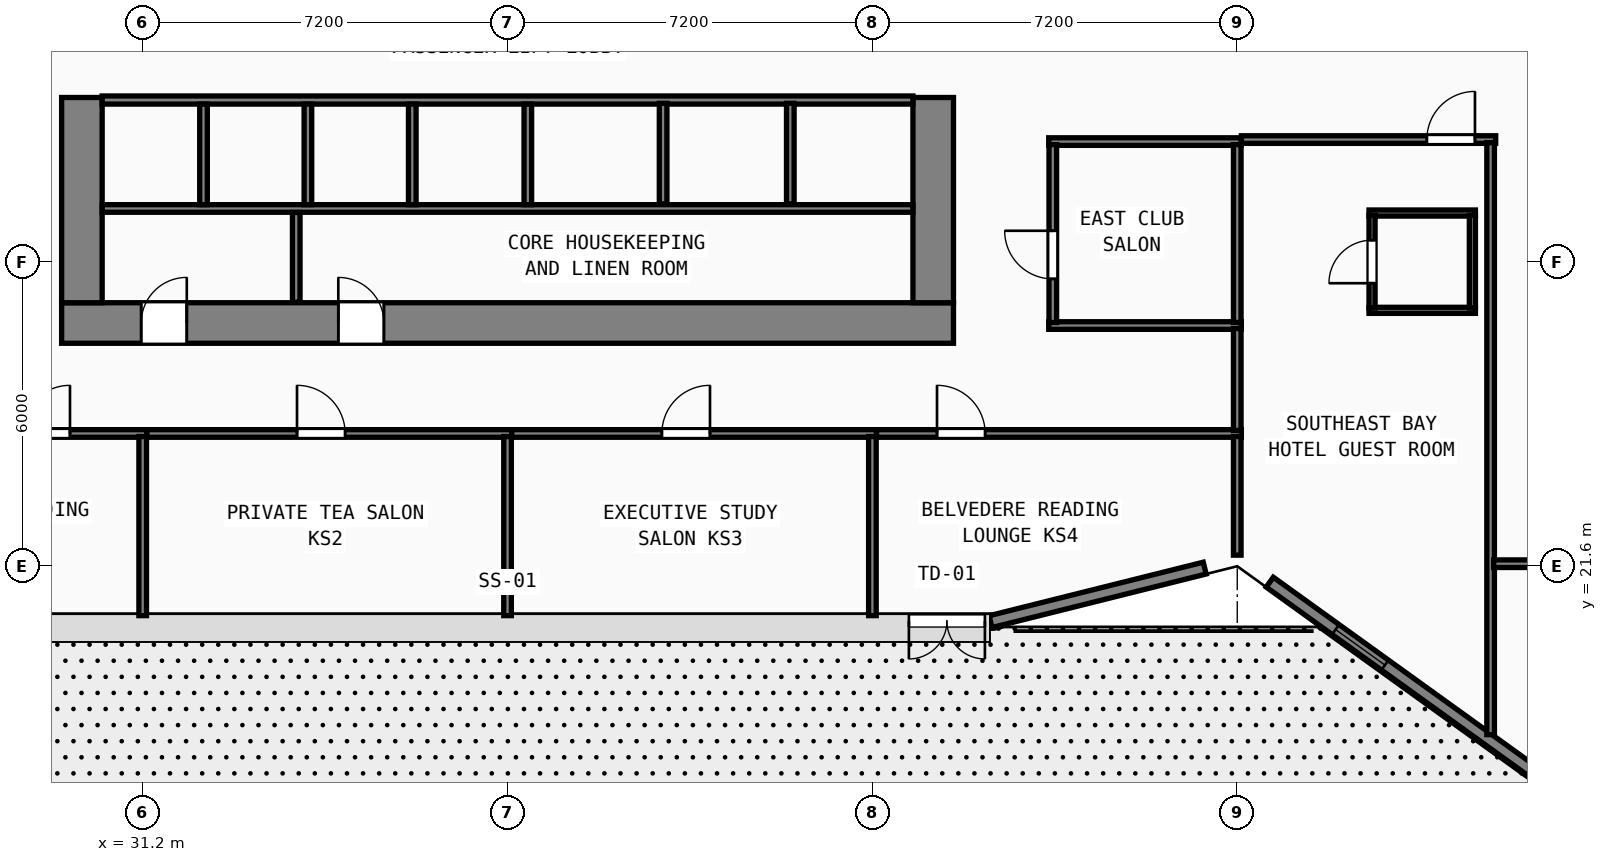
"""IFC4 building model, lengths in metres.
Left out: names, types, materials, properties, quantities, classifications, styles, units other than length and angle.
Written with IfcOpenShell. Run it as: python <this file> out.ifc"""

import sys

from ifc_helpers import new_model, si_unit, direction, frame, frame_2d, origin, origin_2d, place, context, subcontext, project, spatial, rectangle, hollow_rectangle, extrude, element, fill, save


model = new_model("IFC4")
c1 = context("Model", 3, precision=1e-05, world=origin(), true_north=direction((0.0, 1.0)))
c2 = subcontext(c1, "Body", "Model", "MODEL_VIEW")
j1 = project(units=[si_unit("LENGTHUNIT", "METRE"), si_unit("PLANEANGLEUNIT", "RADIAN")], contexts=[c1])
p1 = place(None, origin())
s1 = spatial("IfcSite", under=j1, at=p1, CompositionType="ELEMENT")
p2 = place(p1, origin())
s2 = spatial("IfcBuilding", under=s1, at=p2, CompositionType="ELEMENT")
p3 = place(p2, frame((0.0, 0.0, 24.0)))
s3 = spatial("IfcBuildingStorey", under=s2, at=p3, CompositionType="ELEMENT", Elevation=24.0)
p4 = place(p3, frame((29.6, 26.4, 0.0), z_axis=(0.0, 0.0, 1.0), x_axis=(1.0, 0.0, 0.0)))
e1 = element("IfcWall", 1, at=p4, inside=s3, PredefinedType="SHEAR", context=c2, shape_type="SweptSolid", body=[
    extrude(rectangle(XDim=17.6, YDim=0.8, at=frame_2d((8.8, 0.0))), origin(), (0.0, 0.0, 1.0), 3.6),
])
p5 = place(p4, frame((2.47, 0.0, 0.0), z_axis=(0.0, 0.0, 1.0), x_axis=(-1.0, 0.0, 0.0)))
e2 = element("IfcOpeningElement", 2, at=p5, cuts=e1, PredefinedType="OPENING", context=c2, shape_type="SweptSolid", body=[
    extrude(rectangle(XDim=0.9, YDim=2.1, at=frame_2d((0.45, 1.05))), frame((0.0, 0.41, 0.0), z_axis=(0.0, -1.0, 0.0), x_axis=(1.0, 0.0, 0.0)), (0.0, 0.0, 1.0), 0.82),
])
p6 = place(p4, frame((6.36, 0.0, 0.0), z_axis=(0.0, 0.0, 1.0), x_axis=(-1.0, 0.0, 0.0)))
e3 = element("IfcOpeningElement", 3, at=p6, cuts=e1, PredefinedType="OPENING", context=c2, shape_type="SweptSolid", body=[
    extrude(rectangle(XDim=0.9, YDim=2.1, at=frame_2d((0.45, 1.05))), frame((0.0, 0.41, 0.0), z_axis=(0.0, -1.0, 0.0), x_axis=(1.0, 0.0, 0.0)), (0.0, 0.0, 1.0), 0.82),
])
for number, where, z_axis, x_axis in (
    (4, (30.0, 26.8, 0.0), (0.0, 0.0, 1.0), (0.0, 1.0, 0.0)),
    (5, (46.8, 26.8, 0.0), (0.0, 0.0, 1.0), (0.0, 1.0, 0.0)),
):
    element("IfcWall", number, at=place(p3, frame(where, z_axis=z_axis, x_axis=x_axis)), inside=s3, PredefinedType="SHEAR", context=c2, shape_type="SweptSolid", body=[
        extrude(rectangle(XDim=4.05, YDim=0.8, at=frame_2d((2.025, 0.0))), origin(), (0.0, 0.0, 1.0), 3.6),
    ])
for number, where, z_axis, x_axis in (
    (6, (52.8, 21.6, 0.0), (0.0, 0.0, 1.0), (1.0, 0.0, 0.0)),
    (7, (31.2, 21.6, 0.0), (0.0, 0.0, 1.0), (1.0, 0.0, 0.0)),
    (8, (45.6, 21.6, 0.0), (0.0, 0.0, 1.0), (1.0, 0.0, 0.0)),
):
    element("IfcColumn", number, at=place(p3, frame(where, z_axis=z_axis, x_axis=x_axis)), inside=s3, PredefinedType="COLUMN", context=c2, shape_type="SweptSolid", body=[
        extrude(hollow_rectangle(XDim=1.3, YDim=1.3, WallThickness=0.048, at=origin_2d()), origin(), (0.0, 0.0, 1.0), 3.8),
    ])
for number, where, z_axis, x_axis in (
    (9, (52.8, 27.6, -0.26), (0.0, 0.0, 1.0), (1.0, 0.0, 0.0)),
    (10, (38.4, 21.6, -0.26), (0.0, 0.0, 1.0), (1.0, 0.0, 0.0)),
    (11, (58.5, 19.2, -0.26), (0.0, 0.0, 1.0), (1.0, 0.0, 0.0)),
):
    element("IfcColumn", number, at=place(p3, frame(where, z_axis=z_axis, x_axis=x_axis)), inside=s3, PredefinedType="COLUMN", context=c2, shape_type="SweptSolid", body=[
        extrude(hollow_rectangle(XDim=1.0, YDim=1.0, WallThickness=0.038, at=origin_2d()), origin(), (0.0, 0.0, 1.0), 4.06),
    ])
p7 = place(p3, frame((28.76, 20.52, 0.0), z_axis=(0.0, 0.0, 1.0), x_axis=(1.0, 0.0, 0.0)))
e12 = element("IfcWall", 12, at=p7, inside=s3, PredefinedType="SOLIDWALL", context=c2, shape_type="SweptSolid", body=[
    extrude(rectangle(XDim=19.281, YDim=0.24, at=frame_2d((9.64, 0.0))), origin(), (0.0, 0.0, 1.0), 3.6),
])
p8 = place(p7, frame((19.06, 0.0, 0.0), z_axis=(0.0, 0.0, 1.0), x_axis=(-1.0, 0.0, 0.0)))
e13 = element("IfcOpeningElement", 13, at=p8, cuts=e12, PredefinedType="OPENING", context=c2, shape_type="SweptSolid", body=[
    extrude(rectangle(XDim=1.5, YDim=2.2, at=frame_2d((0.75, 1.1))), frame((0.0, 0.13, 0.0), z_axis=(0.0, -1.0, 0.0), x_axis=(1.0, 0.0, 0.0)), (0.0, 0.0, 1.0), 0.26),
])
p9 = place(p3, frame((47.932, 20.507, 0.0), z_axis=(0.0, 0.0, 1.0), x_axis=(0.970135906278, 0.242561998982, 0.0)))
e14 = element("IfcWall", 14, at=p9, inside=s3, PredefinedType="SOLIDWALL", context=c2, shape_type="SweptSolid", body=[
    extrude(rectangle(XDim=4.356, YDim=0.24, at=frame_2d((2.178, 0.0))), origin(), (0.0, 0.0, 1.0), 3.097),
])
p10 = place(p3, frame((53.442, 21.286, 0.0), z_axis=(0.0, 0.0, 1.0), x_axis=(0.811542842993, -0.584292917967, 0.0)))
e15 = element("IfcWall", 15, at=p10, inside=s3, PredefinedType="SOLIDWALL", context=c2, shape_type="SweptSolid", body=[
    extrude(rectangle(XDim=11.438, YDim=0.24, at=frame_2d((5.719, 0.0))), origin(), (0.0, 0.0, 1.0), 3.097),
])
p11 = place(p10, frame((1.6, 0.0, 0.85)))
e16 = element("IfcOpeningElement", 16, at=p11, cuts=e15, PredefinedType="OPENING", context=c2, shape_type="SweptSolid", body=[
    extrude(rectangle(XDim=1.2, YDim=1.85, at=frame_2d((0.6, 0.925))), frame((0.0, 0.13, 0.0), z_axis=(0.0, -1.0, 0.0), x_axis=(1.0, 0.0, 0.0)), (0.0, 0.0, 1.0), 0.26),
])
p12 = place(p10, frame((7.0, 0.0, 0.85)))
e17 = element("IfcOpeningElement", 17, at=p12, cuts=e15, PredefinedType="OPENING", context=c2, shape_type="SweptSolid", body=[
    extrude(rectangle(XDim=1.2, YDim=1.85, at=frame_2d((0.6, 0.925))), frame((0.0, 0.13, 0.0), z_axis=(0.0, -1.0, 0.0), x_axis=(1.0, 0.0, 0.0)), (0.0, 0.0, 1.0), 0.26),
])
p13 = place(p3, frame((30.4, 30.8, 0.0), z_axis=(0.0, 0.0, 1.0), x_axis=(1.0, 0.0, 0.0)))
e18 = element("IfcWall", 18, at=p13, inside=s3, PredefinedType="SOLIDWALL", context=c2, shape_type="SweptSolid", body=[
    extrude(rectangle(XDim=16.0, YDim=0.16, at=frame_2d((8.0, 0.0))), origin(), (0.0, 0.0, 1.0), 3.6),
])
p14 = place(p3, frame((30.4, 28.66, 0.0), z_axis=(0.0, 0.0, 1.0), x_axis=(1.0, 0.0, 0.0)))
e19 = element("IfcWall", 19, at=p14, inside=s3, PredefinedType="PARTITIONING", context=c2, shape_type="SweptSolid", body=[
    extrude(rectangle(XDim=16.0, YDim=0.15, at=frame_2d((8.0, 0.0))), origin(), (0.0, 0.0, 1.0), 3.6),
])
for number, where, z_axis, x_axis in (
    (20, (32.4, 28.735, 0.0), (0.0, 0.0, 1.0), (0.0, 1.0, 0.0)),
    (21, (34.46, 28.735, 0.0), (0.0, 0.0, 1.0), (0.0, 1.0, 0.0)),
    (22, (36.52, 28.735, 0.0), (0.0, 0.0, 1.0), (0.0, 1.0, 0.0)),
    (23, (38.8, 28.735, 0.0), (0.0, 0.0, 1.0), (0.0, 1.0, 0.0)),
):
    element("IfcWall", number, at=place(p3, frame(where, z_axis=z_axis, x_axis=x_axis)), inside=s3, PredefinedType="SOLIDWALL", context=c2, shape_type="SweptSolid", body=[
        extrude(rectangle(XDim=1.985, YDim=0.15, at=frame_2d((0.992, 0.0))), origin(), (0.0, 0.0, 1.0), 3.6),
    ])
p15 = place(p3, frame((34.23, 26.81, 0.0), z_axis=(0.0, 0.0, 1.0), x_axis=(0.0, 1.0, 0.0)))
e24 = element("IfcWall", 24, at=p15, inside=s3, PredefinedType="PARTITIONING", context=c2, shape_type="SweptSolid", body=[
    extrude(rectangle(XDim=1.77, YDim=0.15, at=frame_2d((0.885, 0.0))), origin(), (0.0, 0.0, 1.0), 3.6),
])
for number, where, z_axis, x_axis in (
    (25, (41.47, 28.75, 0.0), (0.0, 0.0, 1.0), (0.0, 1.0, 0.0)),
    (26, (43.98, 28.75, 0.0), (0.0, 0.0, 1.0), (0.0, 1.0, 0.0)),
):
    element("IfcWall", number, at=place(p3, frame(where, z_axis=z_axis, x_axis=x_axis)), inside=s3, PredefinedType="SOLIDWALL", context=c2, shape_type="SweptSolid", body=[
        extrude(rectangle(XDim=1.985, YDim=0.15, at=frame_2d((0.993, 0.0))), origin(), (0.0, 0.0, 1.0), 3.6),
    ])
for number, where, z_axis, x_axis in (
    (27, (49.08, 29.98, 0.0), (0.0, 0.0, 1.0), (1.0, 0.0, 0.0)),
    (28, (49.08, 26.35, 0.0), (0.0, 0.0, 1.0), (1.0, 0.0, 0.0)),
):
    element("IfcWall", number, at=place(p3, frame(where, z_axis=z_axis, x_axis=x_axis)), inside=s3, PredefinedType="PARTITIONING", context=c2, shape_type="SweptSolid", body=[
        extrude(rectangle(XDim=3.8, YDim=0.15, at=frame_2d((1.9, 0.0))), origin(), (0.0, 0.0, 1.0), 3.6),
    ])
p16 = place(p3, frame((49.16, 26.41, 0.0), z_axis=(0.0, 0.0, 1.0), x_axis=(0.0, 1.0, 0.0)))
e29 = element("IfcWall", 29, at=p16, inside=s3, PredefinedType="PARTITIONING", context=c2, shape_type="SweptSolid", body=[
    extrude(rectangle(XDim=3.51, YDim=0.15, at=frame_2d((1.755, 0.0))), origin(), (0.0, 0.0, 1.0), 3.6),
])
p17 = place(p16, frame((0.86, 0.0, 0.0)))
e30 = element("IfcOpeningElement", 30, at=p17, cuts=e29, PredefinedType="OPENING", context=c2, shape_type="SweptSolid", body=[
    extrude(rectangle(XDim=0.95, YDim=2.12, at=frame_2d((0.475, 1.06))), frame((0.0, 0.085, 0.0), z_axis=(0.0, -1.0, 0.0), x_axis=(1.0, 0.0, 0.0)), (0.0, 0.0, 1.0), 0.17),
])
p18 = place(p3, frame((52.8, 26.41, 0.0), z_axis=(0.0, 0.0, 1.0), x_axis=(0.0, 1.0, 0.0)))
e31 = element("IfcWall", 31, at=p18, inside=s3, PredefinedType="PARTITIONING", context=c2, shape_type="SweptSolid", body=[
    extrude(rectangle(XDim=3.51, YDim=0.15, at=frame_2d((1.755, 0.0))), origin(), (0.0, 0.0, 1.0), 3.097),
])
p19 = place(p3, frame((23.92, 24.22, 0.0), z_axis=(0.0, 0.0, 1.0), x_axis=(1.0, 0.0, 0.0)))
e32 = element("IfcWall", 32, at=p19, inside=s3, PredefinedType="PARTITIONING", context=c2, shape_type="SweptSolid", body=[
    extrude(rectangle(XDim=7.36, YDim=0.15, at=frame_2d((3.68, 0.0))), origin(), (0.0, 0.0, 1.0), 3.6),
])
p20 = place(p19, frame((5.845, 0.0, 0.0), z_axis=(0.0, 0.0, 1.0), x_axis=(-1.0, 0.0, 0.0)))
e33 = element("IfcOpeningElement", 33, at=p20, cuts=e32, PredefinedType="OPENING", context=c2, shape_type="SweptSolid", body=[
    extrude(rectangle(XDim=0.95, YDim=2.12, at=frame_2d((0.475, 1.06))), frame((0.0, 0.085, 0.0), z_axis=(0.0, -1.0, 0.0), x_axis=(1.0, 0.0, 0.0)), (0.0, 0.0, 1.0), 0.17),
])
p21 = place(p3, frame((31.2, 20.625, 0.0), z_axis=(0.0, 0.0, 1.0), x_axis=(0.0, 1.0, 0.0)))
e34 = element("IfcWall", 34, at=p21, inside=s3, PredefinedType="PARTITIONING", context=c2, shape_type="SweptSolid", body=[
    extrude(rectangle(XDim=3.535, YDim=0.15, at=frame_2d((1.768, 0.0))), origin(), (0.0, 0.0, 1.0), 2.985),
])
p22 = place(p3, frame((31.282, 24.22, 0.0), z_axis=(0.0, 0.0, 1.0), x_axis=(1.0, 0.0, 0.0)))
e35 = element("IfcWall", 35, at=p22, inside=s3, PredefinedType="PARTITIONING", context=c2, shape_type="SweptSolid", body=[
    extrude(rectangle(XDim=7.198, YDim=0.15, at=frame_2d((3.599, 0.0))), origin(), (0.0, 0.0, 1.0), 3.6),
])
p23 = place(p22, frame((3.913, 0.0, 0.0), z_axis=(0.0, 0.0, 1.0), x_axis=(-1.0, 0.0, 0.0)))
e36 = element("IfcOpeningElement", 36, at=p23, cuts=e35, PredefinedType="OPENING", context=c2, shape_type="SweptSolid", body=[
    extrude(rectangle(XDim=0.95, YDim=2.12, at=frame_2d((0.475, 1.06))), frame((0.0, 0.085, 0.0), z_axis=(0.0, -1.0, 0.0), x_axis=(1.0, 0.0, 0.0)), (0.0, 0.0, 1.0), 0.17),
])
p24 = place(p3, frame((38.4, 20.625, 0.0), z_axis=(0.0, 0.0, 1.0), x_axis=(0.0, 1.0, 0.0)))
e37 = element("IfcWall", 37, at=p24, inside=s3, PredefinedType="PARTITIONING", context=c2, shape_type="SweptSolid", body=[
    extrude(rectangle(XDim=3.535, YDim=0.15, at=frame_2d((1.768, 0.0))), origin(), (0.0, 0.0, 1.0), 2.985),
])
p25 = place(p3, frame((38.482, 24.22, 0.0), z_axis=(0.0, 0.0, 1.0), x_axis=(1.0, 0.0, 0.0)))
e38 = element("IfcWall", 38, at=p25, inside=s3, PredefinedType="PARTITIONING", context=c2, shape_type="SweptSolid", body=[
    extrude(rectangle(XDim=7.198, YDim=0.15, at=frame_2d((3.599, 0.0))), origin(), (0.0, 0.0, 1.0), 3.6),
])
p26 = place(p25, frame((3.913, 0.0, 0.0), z_axis=(0.0, 0.0, 1.0), x_axis=(-1.0, 0.0, 0.0)))
e39 = element("IfcOpeningElement", 39, at=p26, cuts=e38, PredefinedType="OPENING", context=c2, shape_type="SweptSolid", body=[
    extrude(rectangle(XDim=0.95, YDim=2.12, at=frame_2d((0.475, 1.06))), frame((0.0, 0.085, 0.0), z_axis=(0.0, -1.0, 0.0), x_axis=(1.0, 0.0, 0.0)), (0.0, 0.0, 1.0), 0.17),
])
p27 = place(p3, frame((45.6, 20.625, 0.0), z_axis=(0.0, 0.0, 1.0), x_axis=(0.0, 1.0, 0.0)))
e40 = element("IfcWall", 40, at=p27, inside=s3, PredefinedType="PARTITIONING", context=c2, shape_type="SweptSolid", body=[
    extrude(rectangle(XDim=3.535, YDim=0.15, at=frame_2d((1.768, 0.0))), origin(), (0.0, 0.0, 1.0), 2.985),
])
p28 = place(p3, frame((45.682, 24.22, 0.0), z_axis=(0.0, 0.0, 1.0), x_axis=(1.0, 0.0, 0.0)))
e41 = element("IfcWall", 41, at=p28, inside=s3, PredefinedType="PARTITIONING", context=c2, shape_type="SweptSolid", body=[
    extrude(rectangle(XDim=7.198, YDim=0.15, at=frame_2d((3.599, 0.0))), origin(), (0.0, 0.0, 1.0), 3.6),
])
p29 = place(p28, frame((2.143, 0.0, 0.0), z_axis=(0.0, 0.0, 1.0), x_axis=(-1.0, 0.0, 0.0)))
e42 = element("IfcOpeningElement", 42, at=p29, cuts=e41, PredefinedType="OPENING", context=c2, shape_type="SweptSolid", body=[
    extrude(rectangle(XDim=0.95, YDim=2.12, at=frame_2d((0.475, 1.06))), frame((0.0, 0.085, 0.0), z_axis=(0.0, -1.0, 0.0), x_axis=(1.0, 0.0, 0.0)), (0.0, 0.0, 1.0), 0.17),
])
p30 = place(p3, frame((52.8, 21.819, 0.0), z_axis=(0.0, 0.0, 1.0), x_axis=(0.0, 1.0, 0.0)))
e43 = element("IfcWall", 43, at=p30, inside=s3, PredefinedType="PARTITIONING", context=c2, shape_type="SweptSolid", body=[
    extrude(rectangle(XDim=2.341, YDim=0.15, at=frame_2d((1.171, 0.0))), origin(), (0.0, 0.0, 1.0), 3.097),
])
p31 = place(p3, frame((52.882, 30.02, 0.0), z_axis=(0.0, 0.0, 1.0), x_axis=(1.0, 0.0, 0.0)))
e44 = element("IfcWall", 44, at=p31, inside=s3, PredefinedType="PARTITIONING", context=c2, shape_type="SweptSolid", body=[
    extrude(rectangle(XDim=5.018, YDim=0.15, at=frame_2d((2.509, 0.0))), origin(), (0.0, 0.0, 1.0), 3.6),
])
p32 = place(p31, frame((4.609, 0.0, 0.0), z_axis=(0.0, 0.0, 1.0), x_axis=(-1.0, 0.0, 0.0)))
e45 = element("IfcOpeningElement", 45, at=p32, cuts=e44, PredefinedType="OPENING", context=c2, shape_type="SweptSolid", body=[
    extrude(rectangle(XDim=0.95, YDim=2.15, at=frame_2d((0.475, 1.075))), frame((0.0, 0.085, 0.0), z_axis=(0.0, -1.0, 0.0), x_axis=(1.0, 0.0, 0.0)), (0.0, 0.0, 1.0), 0.17),
])
p33 = place(p3, frame((52.8, 24.28, 0.0), z_axis=(0.0, 0.0, 1.0), x_axis=(0.0, 1.0, 0.0)))
e46 = element("IfcWall", 46, at=p33, inside=s3, PredefinedType="PARTITIONING", context=c2, shape_type="SweptSolid", body=[
    extrude(rectangle(XDim=2.01, YDim=0.15, at=frame_2d((1.005, 0.0))), origin(), (0.0, 0.0, 1.0), 3.097),
])
p34 = place(p3, frame((57.8, 18.277, 0.0), z_axis=(0.0, 0.0, 1.0), x_axis=(0.0, 1.0, 0.0)))
e47 = element("IfcWall", 47, at=p34, inside=s3, PredefinedType="PARTITIONING", context=c2, shape_type="SweptSolid", body=[
    extrude(rectangle(XDim=11.683, YDim=0.15, at=frame_2d((5.841, 0.0))), origin(), (0.0, 0.0, 1.0), 3.6),
])
for number, where, z_axis, x_axis in (
    (48, (55.4, 28.57, 0.0), (0.0, 0.0, 1.0), (1.0, 0.0, 0.0)),
    (49, (55.4, 26.65, 0.0), (0.0, 0.0, 1.0), (1.0, 0.0, 0.0)),
):
    element("IfcWall", number, at=place(p3, frame(where, z_axis=z_axis, x_axis=x_axis)), inside=s3, PredefinedType="PARTITIONING", context=c2, shape_type="SweptSolid", body=[
        extrude(rectangle(XDim=2.1, YDim=0.12, at=frame_2d((1.05, 0.0))), origin(), (0.0, 0.0, 1.0), 3.6),
    ])
p35 = place(p3, frame((55.46, 26.695, 0.0), z_axis=(0.0, 0.0, 1.0), x_axis=(0.0, 1.0, 0.0)))
e50 = element("IfcWall", 50, at=p35, inside=s3, PredefinedType="PARTITIONING", context=c2, shape_type="SweptSolid", body=[
    extrude(rectangle(XDim=1.83, YDim=0.12, at=frame_2d((0.915, 0.0))), origin(), (0.0, 0.0, 1.0), 3.6),
])
p36 = place(p35, frame((1.34, 0.0, 0.0), z_axis=(0.0, 0.0, 1.0), x_axis=(-1.0, 0.0, 0.0)))
e51 = element("IfcOpeningElement", 51, at=p36, cuts=e50, PredefinedType="OPENING", context=c2, shape_type="SweptSolid", body=[
    extrude(rectangle(XDim=0.85, YDim=2.1, at=frame_2d((0.425, 1.05))), frame((0.0, 0.07, 0.0), z_axis=(0.0, -1.0, 0.0), x_axis=(1.0, 0.0, 0.0)), (0.0, 0.0, 1.0), 0.14),
])
p37 = place(p3, frame((57.44, 26.695, 0.0), z_axis=(0.0, 0.0, 1.0), x_axis=(0.0, 1.0, 0.0)))
e52 = element("IfcWall", 52, at=p37, inside=s3, PredefinedType="PARTITIONING", context=c2, shape_type="SweptSolid", body=[
    extrude(rectangle(XDim=1.83, YDim=0.12, at=frame_2d((0.915, 0.0))), origin(), (0.0, 0.0, 1.0), 3.6),
])
p38 = place(p3, frame((57.86, 21.65, 0.0), z_axis=(0.0, 0.0, 1.0), x_axis=(1.0, 0.0, 0.0)))
e53 = element("IfcWall", 53, at=p38, inside=s3, PredefinedType="PARTITIONING", context=c2, shape_type="SweptSolid", body=[
    extrude(rectangle(XDim=7.24, YDim=0.15, at=frame_2d((3.62, 0.0))), origin(), (0.0, 0.0, 1.0), 3.6),
])
p39 = place(p38, frame((2.69, 0.0, 0.0), z_axis=(0.0, 0.0, 1.0), x_axis=(-1.0, 0.0, 0.0)))
e54 = element("IfcOpeningElement", 54, at=p39, cuts=e53, PredefinedType="OPENING", context=c2, shape_type="SweptSolid", body=[
    extrude(rectangle(XDim=0.95, YDim=2.15, at=frame_2d((0.475, 1.075))), frame((0.0, 0.085, 0.0), z_axis=(0.0, -1.0, 0.0), x_axis=(1.0, 0.0, 0.0)), (0.0, 0.0, 1.0), 0.17),
])
p40 = place(p11, origin())
e55 = element("IfcWindow", 55, at=p40, inside=s3, PartitioningType="SINGLE_PANEL", PredefinedType="WINDOW", context=c2, shape_type="SweptSolid", body=[
    extrude(rectangle(XDim=1.2, YDim=1.85, at=frame_2d((0.6, 0.925))), frame((0.0, 0.03, 0.0), z_axis=(0.0, -1.0, 0.0), x_axis=(1.0, 0.0, 0.0)), (0.0, 0.0, 1.0), 0.06),
])
fill(e16, e55)
p41 = place(p8, origin())
e56 = element("IfcDoor", 56, at=p41, inside=s3, OperationType="DOUBLE_DOOR_SINGLE_SWING", PredefinedType="DOOR", context=c2, shape_type="SweptSolid", body=[
    extrude(rectangle(XDim=1.5, YDim=2.2, at=frame_2d((0.75, 1.1))), frame((0.0, 0.025, 0.0), z_axis=(0.0, -1.0, 0.0), x_axis=(1.0, 0.0, 0.0)), (0.0, 0.0, 1.0), 0.05),
])
fill(e13, e56)
p42 = place(p5, origin())
e57 = element("IfcDoor", 57, at=p42, inside=s3, OperationType="SINGLE_SWING_LEFT", PredefinedType="DOOR", context=c2, shape_type="SweptSolid", body=[
    extrude(rectangle(XDim=0.9, YDim=2.1, at=frame_2d((0.45, 1.05))), frame((0.0, -0.195, 0.0), z_axis=(0.0, -1.0, 0.0), x_axis=(1.0, 0.0, 0.0)), (0.0, 0.0, 1.0), 0.05),
])
fill(e2, e57)
p43 = place(p6, origin())
e58 = element("IfcDoor", 58, at=p43, inside=s3, OperationType="SINGLE_SWING_RIGHT", PredefinedType="DOOR", context=c2, shape_type="SweptSolid", body=[
    extrude(rectangle(XDim=0.9, YDim=2.1, at=frame_2d((0.45, 1.05))), frame((0.0, -0.195, 0.0), z_axis=(0.0, -1.0, 0.0), x_axis=(1.0, 0.0, 0.0)), (0.0, 0.0, 1.0), 0.05),
])
fill(e3, e58)
p44 = place(p17, origin())
e59 = element("IfcDoor", 59, at=p44, inside=s3, OperationType="SINGLE_SWING_RIGHT", PredefinedType="DOOR", context=c2, shape_type="SweptSolid", body=[
    extrude(rectangle(XDim=0.95, YDim=2.12, at=frame_2d((0.475, 1.06))), frame((0.0, 0.025, 0.0), z_axis=(0.0, -1.0, 0.0), x_axis=(1.0, 0.0, 0.0)), (0.0, 0.0, 1.0), 0.05),
])
fill(e30, e59)
p45 = place(p20, origin())
e60 = element("IfcDoor", 60, at=p45, inside=s3, OperationType="SINGLE_SWING_LEFT", PredefinedType="DOOR", context=c2, shape_type="SweptSolid", body=[
    extrude(rectangle(XDim=0.95, YDim=2.12, at=frame_2d((0.475, 1.06))), frame((0.0, 0.025, 0.0), z_axis=(0.0, -1.0, 0.0), x_axis=(1.0, 0.0, 0.0)), (0.0, 0.0, 1.0), 0.05),
])
fill(e33, e60)
p46 = place(p23, origin())
e61 = element("IfcDoor", 61, at=p46, inside=s3, OperationType="SINGLE_SWING_RIGHT", PredefinedType="DOOR", context=c2, shape_type="SweptSolid", body=[
    extrude(rectangle(XDim=0.95, YDim=2.12, at=frame_2d((0.475, 1.06))), frame((0.0, 0.025, 0.0), z_axis=(0.0, -1.0, 0.0), x_axis=(1.0, 0.0, 0.0)), (0.0, 0.0, 1.0), 0.05),
])
fill(e36, e61)
p47 = place(p26, origin())
e62 = element("IfcDoor", 62, at=p47, inside=s3, OperationType="SINGLE_SWING_LEFT", PredefinedType="DOOR", context=c2, shape_type="SweptSolid", body=[
    extrude(rectangle(XDim=0.95, YDim=2.12, at=frame_2d((0.475, 1.06))), frame((0.0, 0.025, 0.0), z_axis=(0.0, -1.0, 0.0), x_axis=(1.0, 0.0, 0.0)), (0.0, 0.0, 1.0), 0.05),
])
fill(e39, e62)
p48 = place(p29, origin())
e63 = element("IfcDoor", 63, at=p48, inside=s3, OperationType="SINGLE_SWING_RIGHT", PredefinedType="DOOR", context=c2, shape_type="SweptSolid", body=[
    extrude(rectangle(XDim=0.95, YDim=2.12, at=frame_2d((0.475, 1.06))), frame((0.0, 0.025, 0.0), z_axis=(0.0, -1.0, 0.0), x_axis=(1.0, 0.0, 0.0)), (0.0, 0.0, 1.0), 0.05),
])
fill(e42, e63)
p49 = place(p32, origin())
e64 = element("IfcDoor", 64, at=p49, inside=s3, OperationType="SINGLE_SWING_LEFT", PredefinedType="DOOR", context=c2, shape_type="SweptSolid", body=[
    extrude(rectangle(XDim=0.95, YDim=2.15, at=frame_2d((0.475, 1.075))), frame((0.0, 0.025, 0.0), z_axis=(0.0, -1.0, 0.0), x_axis=(1.0, 0.0, 0.0)), (0.0, 0.0, 1.0), 0.05),
])
fill(e45, e64)
p50 = place(p36, origin())
e65 = element("IfcDoor", 65, at=p50, inside=s3, OperationType="SINGLE_SWING_RIGHT", PredefinedType="DOOR", context=c2, shape_type="SweptSolid", body=[
    extrude(rectangle(XDim=0.85, YDim=2.1, at=frame_2d((0.425, 1.05))), frame((0.0, 0.025, 0.0), z_axis=(0.0, -1.0, 0.0), x_axis=(1.0, 0.0, 0.0)), (0.0, 0.0, 1.0), 0.05),
])
fill(e51, e65)
save(model, sys.argv[1])
